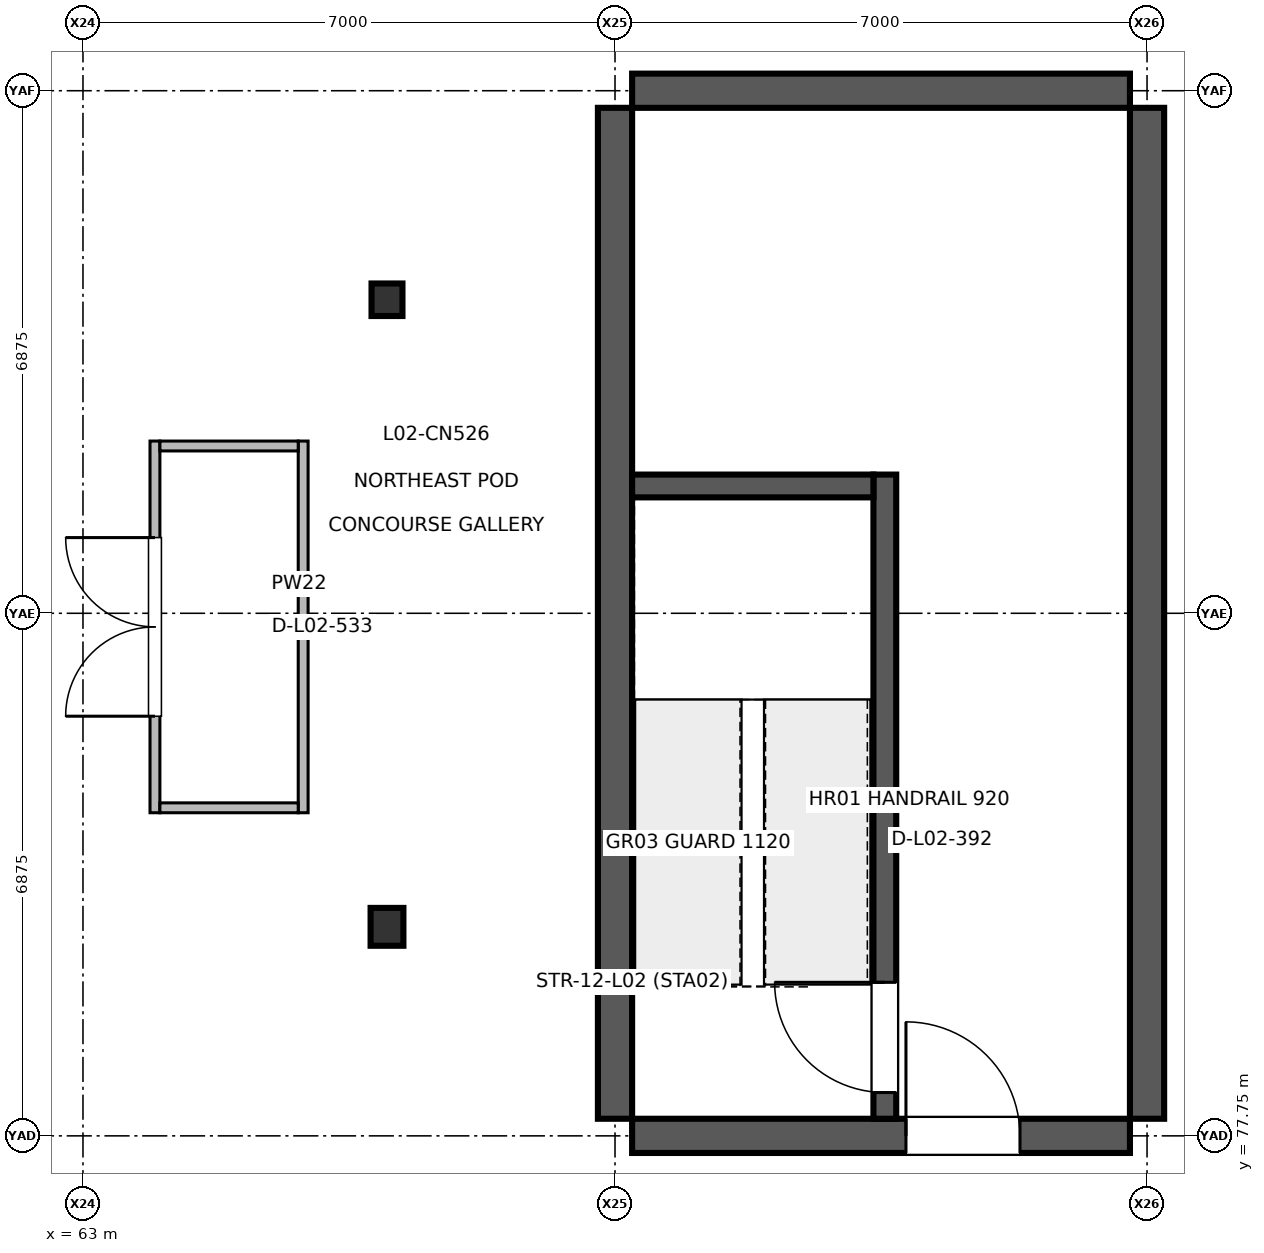
"""IFC4 building model, lengths in metres.
Left out: names, types, materials, properties, quantities, classifications, styles, units other than length and angle.
Written with IfcOpenShell. Run it as: python <this file> out.ifc"""

import sys

from ifc_helpers import new_model, si_unit, direction, frame, frame_2d, origin, origin_2d, place, context, subcontext, project, spatial, rectangle, i_section, extrude, element, fill, save


model = new_model("IFC4")
c1 = context("Model", 3, precision=1e-05, world=origin(), true_north=direction((0.0, 1.0)))
c2 = subcontext(c1, "Body", "Model", "MODEL_VIEW")
j1 = project(units=[si_unit("LENGTHUNIT", "METRE"), si_unit("PLANEANGLEUNIT", "RADIAN")], contexts=[c1])
p1 = place(None, origin())
s1 = spatial("IfcSite", under=j1, at=p1, CompositionType="ELEMENT")
p2 = place(p1, origin())
s2 = spatial("IfcBuilding", under=s1, at=p2, CompositionType="ELEMENT")
p3 = place(p2, frame((0.0, 0.0, 6.0)))
s3 = spatial("IfcBuildingStorey", under=s2, at=p3, CompositionType="ELEMENT", Elevation=6.0)
p4 = place(p3, frame((67.0, 80.5, 0.0), z_axis=(0.0, 0.0, 1.0), x_axis=(1.0, 0.0, 0.0)))
e1 = element("IfcColumn", 1, at=p4, inside=s3, PredefinedType="COLUMN", context=c2, shape_type="SweptSolid", body=[
    extrude(i_section(OverallWidth=0.432, OverallDepth=0.498, WebThickness=0.024, FlangeThickness=0.038, at=origin_2d()), origin(), (0.0, 0.0, 1.0), 5.398),
])
p5 = place(p3, frame((67.0, 88.75, 0.0), z_axis=(0.0, 0.0, 1.0), x_axis=(1.0, 0.0, 0.0)))
e2 = element("IfcColumn", 2, at=p5, inside=s3, PredefinedType="COLUMN", context=c2, shape_type="SweptSolid", body=[
    extrude(i_section(OverallWidth=0.407, OverallDepth=0.428, WebThickness=0.02, FlangeThickness=0.035, at=origin_2d()), origin(), (0.0, 0.0, 1.0), 5.398),
])
for number, where, z_axis, x_axis in (
    (3, (70.0, 77.975, 0.0), (0.0, 0.0, 1.0), (0.0, 1.0, 0.0)),
    (4, (77.0, 77.975, 0.0), (0.0, 0.0, 1.0), (0.0, 1.0, 0.0)),
):
    element("IfcWall", number, at=place(p3, frame(where, z_axis=z_axis, x_axis=x_axis)), inside=s3, PredefinedType="SHEAR", context=c2, shape_type="SweptSolid", body=[
        extrude(rectangle(XDim=13.3, YDim=0.45, at=frame_2d((6.65, 0.0))), origin(), (0.0, 0.0, 1.0), 5.18),
    ])
p6 = place(p3, frame((70.225, 77.75, 0.0), z_axis=(0.0, 0.0, 1.0), x_axis=(1.0, 0.0, 0.0)))
e5 = element("IfcWall", 5, at=p6, inside=s3, PredefinedType="SHEAR", context=c2, shape_type="SweptSolid", body=[
    extrude(rectangle(XDim=6.55, YDim=0.45, at=frame_2d((3.275, 0.0))), origin(), (0.0, 0.0, 1.0), 5.18),
])
p7 = place(p6, frame((3.603, 0.0, 0.0)))
e6 = element("IfcOpeningElement", 6, at=p7, cuts=e5, PredefinedType="OPENING", context=c2, shape_type="SweptSolid", body=[
    extrude(rectangle(XDim=1.5, YDim=2.2, at=frame_2d((0.75, 1.1))), frame((0.0, 0.235, 0.0), z_axis=(0.0, -1.0, 0.0), x_axis=(1.0, 0.0, 0.0)), (0.0, 0.0, 1.0), 0.47),
])
p8 = place(p3, frame((70.225, 91.5, 0.0), z_axis=(0.0, 0.0, 1.0), x_axis=(1.0, 0.0, 0.0)))
e7 = element("IfcWall", 7, at=p8, inside=s3, PredefinedType="SHEAR", context=c2, shape_type="SweptSolid", body=[
    extrude(rectangle(XDim=6.55, YDim=0.45, at=frame_2d((3.275, 0.0))), origin(), (0.0, 0.0, 1.0), 5.18),
])
p9 = place(p3, frame((73.55, 77.975, 0.0), z_axis=(0.0, 0.0, 1.0), x_axis=(0.0, 1.0, 0.0)))
e8 = element("IfcWall", 8, at=p9, inside=s3, PredefinedType="SHEAR", context=c2, shape_type="SweptSolid", body=[
    extrude(rectangle(XDim=8.475, YDim=0.3, at=frame_2d((4.237, 0.0))), origin(), (0.0, 0.0, 1.0), 5.18),
])
p10 = place(p9, frame((0.345, 0.0, 0.0)))
e9 = element("IfcOpeningElement", 9, at=p10, cuts=e8, PredefinedType="OPENING", context=c2, shape_type="SweptSolid", body=[
    extrude(rectangle(XDim=1.45, YDim=2.2, at=frame_2d((0.725, 1.1))), frame((0.0, 0.16, 0.0), z_axis=(0.0, -1.0, 0.0), x_axis=(1.0, 0.0, 0.0)), (0.0, 0.0, 1.0), 0.32),
])
p11 = place(p3, frame((63.947, 82.001, 0.0), z_axis=(0.0, 0.0, 1.0), x_axis=(0.0, 1.0, 0.0)))
e10 = element("IfcWall", 10, at=p11, inside=s3, PredefinedType="PARTITIONING", context=c2, shape_type="SweptSolid", body=[
    extrude(rectangle(XDim=4.89, YDim=0.13, at=frame_2d((2.445, 0.0))), origin(), (0.0, 0.0, 1.0), 4.42),
])
p12 = place(p11, frame((1.27, 0.0, 0.0)))
e11 = element("IfcOpeningElement", 11, at=p12, cuts=e10, PredefinedType="OPENING", context=c2, shape_type="SweptSolid", body=[
    extrude(rectangle(XDim=2.35, YDim=2.5, at=frame_2d((1.175, 1.25))), frame((0.0, 0.075, 0.0), z_axis=(0.0, -1.0, 0.0), x_axis=(1.0, 0.0, 0.0)), (0.0, 0.0, 1.0), 0.15),
])
p13 = place(p3, frame((65.897, 82.001, 0.0), z_axis=(0.0, 0.0, 1.0), x_axis=(0.0, 1.0, 0.0)))
e12 = element("IfcWall", 12, at=p13, inside=s3, PredefinedType="PARTITIONING", context=c2, shape_type="SweptSolid", body=[
    extrude(rectangle(XDim=4.89, YDim=0.13, at=frame_2d((2.445, 0.0))), origin(), (0.0, 0.0, 1.0), 4.42),
])
for number, where, z_axis, x_axis in (
    (13, (64.012, 82.066, 0.0), (0.0, 0.0, 1.0), (1.0, 0.0, 0.0)),
    (14, (64.012, 86.826, 0.0), (0.0, 0.0, 1.0), (1.0, 0.0, 0.0)),
):
    element("IfcWall", number, at=place(p3, frame(where, z_axis=z_axis, x_axis=x_axis)), inside=s3, PredefinedType="PARTITIONING", context=c2, shape_type="SweptSolid", body=[
        extrude(rectangle(XDim=1.82, YDim=0.13, at=frame_2d((0.91, 0.0))), origin(), (0.0, 0.0, 1.0), 4.42),
    ])
p14 = place(p3, frame((70.225, 86.3, 0.0), z_axis=(0.0, 0.0, 1.0), x_axis=(1.0, 0.0, 0.0)))
e15 = element("IfcWall", 15, at=p14, inside=s3, PredefinedType="SHEAR", context=c2, shape_type="SweptSolid", body=[
    extrude(rectangle(XDim=3.175, YDim=0.3, at=frame_2d((1.587, 0.0))), origin(), (0.0, 0.0, 1.0), 5.18),
])
p15 = place(p7, origin())
e16 = element("IfcDoor", 16, at=p15, inside=s3, OperationType="SINGLE_SWING_LEFT", PredefinedType="DOOR", context=c2, shape_type="SweptSolid", body=[
    extrude(rectangle(XDim=1.5, YDim=2.2, at=frame_2d((0.75, 1.1))), frame((0.0, 0.025, 0.0), z_axis=(0.0, -1.0, 0.0), x_axis=(1.0, 0.0, 0.0)), (0.0, 0.0, 1.0), 0.05),
])
fill(e6, e16)
p16 = place(p10, origin())
e17 = element("IfcDoor", 17, at=p16, inside=s3, OperationType="SINGLE_SWING_RIGHT", PredefinedType="DOOR", context=c2, shape_type="SweptSolid", body=[
    extrude(rectangle(XDim=1.45, YDim=2.2, at=frame_2d((0.725, 1.1))), frame((0.0, 0.025, 0.0), z_axis=(0.0, -1.0, 0.0), x_axis=(1.0, 0.0, 0.0)), (0.0, 0.0, 1.0), 0.05),
])
fill(e9, e17)
p17 = place(p12, origin())
e18 = element("IfcDoor", 18, at=p17, inside=s3, OperationType="DOUBLE_DOOR_SINGLE_SWING", PredefinedType="DOOR", context=c2, shape_type="SweptSolid", body=[
    extrude(rectangle(XDim=2.35, YDim=2.5, at=frame_2d((1.175, 1.25))), frame((0.0, 0.025, 0.0), z_axis=(0.0, -1.0, 0.0), x_axis=(1.0, 0.0, 0.0)), (0.0, 0.0, 1.0), 0.05),
])
fill(e11, e18)
save(model, sys.argv[1])
